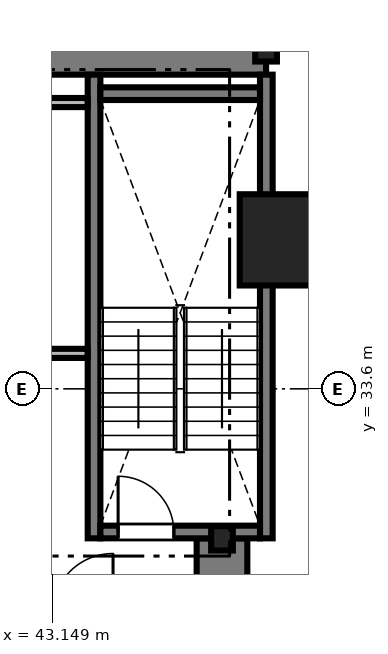
"""IFC4 building model, lengths in metres.
Left out: names, types, materials, properties, quantities, classifications, styles, units other than length and angle.
Written with IfcOpenShell. Run it as: python <this file> out.ifc"""

import sys

from ifc_helpers import new_model, si_unit, direction, frame, frame_2d, origin, origin_2d, place, context, subcontext, project, spatial, rectangle, i_section, extrude, source, transform, mapped, element, fill, save


model = new_model("IFC4")
c1 = context("Model", 3, precision=1e-05, world=origin(), true_north=direction((0.0, 1.0)))
c2 = subcontext(c1, "Body", "Model", "MODEL_VIEW")
j1 = project(units=[si_unit("LENGTHUNIT", "METRE"), si_unit("PLANEANGLEUNIT", "RADIAN")], contexts=[c1])
p1 = place(None, origin())
s1 = spatial("IfcSite", under=j1, at=p1, CompositionType="ELEMENT")
p2 = place(p1, origin())
s2 = spatial("IfcBuilding", under=s1, at=p2, CompositionType="ELEMENT")
p3 = place(p2, frame((0.0, 0.0, 31.25)))
s3 = spatial("IfcBuildingStorey", under=s2, at=p3, CompositionType="ELEMENT", Elevation=31.25)
m1 = source(origin(), c2, "Body", "SweptSolid", [
    extrude(rectangle(XDim=17.52, YDim=1.0, at=frame_2d((8.76, 0.0))), origin(), (0.0, 0.0, 1.0), 3.41),
])
p4 = place(p3, frame((29.85, 40.3, 0.0), z_axis=(0.0, 0.0, 1.0), x_axis=(1.0, 0.0, 0.0)))
e1 = element("IfcWall", 1, at=p4, inside=s3, PredefinedType="SHEAR", context=c2, shape_type="MappedRepresentation", body=[
    mapped(m1, transform((0.0, 0.0, 0.0), scale=1.0)),
])
m2 = source(origin(), c2, "Body", "SweptSolid", [
    extrude(rectangle(XDim=13.15, YDim=1.0, at=frame_2d((6.575, 0.0))), origin(), (0.0, 0.0, 1.0), 3.41),
])
p5 = place(p3, frame((46.5, 17.5, 0.0), z_axis=(0.0, 0.0, 1.0), x_axis=(0.0, 1.0, 0.0)))
e2 = element("IfcWall", 2, at=p5, inside=s3, PredefinedType="SHEAR", context=c2, shape_type="MappedRepresentation", body=[
    mapped(m2, transform((0.0, 0.0, 0.0), scale=1.0)),
])
m3 = source(origin(), c2, "Body", "SweptSolid", [
    extrude(i_section(OverallWidth=0.428, OverallDepth=0.481, WebThickness=0.04, FlangeThickness=0.063, FilletRadius=0.015, at=origin_2d()), origin(), (0.0, 0.0, 1.0), 3.41),
])
for number, where, z_axis, x_axis in (
    (3, (46.5, 30.65, 0.0), (0.0, 0.0, 1.0), (1.0, 0.0, 0.0)),
    (4, (47.37, 40.3, 0.0), (0.0, 0.0, 1.0), (1.0, 0.0, 0.0)),
):
    element("IfcColumn", number, at=place(p3, frame(where, z_axis=z_axis, x_axis=x_axis)), inside=s3, PredefinedType="COLUMN", context=c2, shape_type="MappedRepresentation", body=[
        mapped(m3, transform((0.0, 0.0, 0.0), scale=1.0)),
    ])
m4 = source(origin(), c2, "Body", "SweptSolid", [
    extrude(rectangle(XDim=1.8, YDim=1.8, at=origin_2d()), origin(), (0.0, 0.0, 1.0), 3.41),
])
p6 = place(p3, frame((47.75, 36.54, 0.0), z_axis=(0.0, 0.0, 1.0), x_axis=(1.0, 0.0, 0.0)))
e5 = element("IfcColumn", 5, at=p6, inside=s3, PredefinedType="COLUMN", context=c2, shape_type="MappedRepresentation", body=[
    mapped(m4, transform((0.0, 0.0, 0.0), scale=1.0)),
])
m5 = source(origin(), c2, "Body", "SweptSolid", [
    extrude(rectangle(XDim=9.15, YDim=0.25, at=frame_2d((4.575, 0.0))), origin(), (0.0, 0.0, 1.0), 3.45),
])
for number, where, z_axis, x_axis in (
    (6, (43.975, 30.65, 0.0), (0.0, 0.0, 1.0), (0.0, 1.0, 0.0)),
    (7, (47.375, 30.65, 0.0), (0.0, 0.0, 1.0), (0.0, 1.0, 0.0)),
):
    element("IfcWall", number, at=place(p3, frame(where, z_axis=z_axis, x_axis=x_axis)), inside=s3, PredefinedType="SOLIDWALL", context=c2, shape_type="MappedRepresentation", body=[
        mapped(m5, transform((0.0, 0.0, 0.0), scale=1.0)),
    ])
m6 = source(origin(), c2, "Body", "SweptSolid", [
    extrude(rectangle(XDim=3.15, YDim=0.25, at=frame_2d((1.575, 0.0))), origin(), (0.0, 0.0, 1.0), 3.45),
])
p7 = place(p3, frame((44.1, 39.425, 0.0), z_axis=(0.0, 0.0, 1.0), x_axis=(1.0, 0.0, 0.0)))
e8 = element("IfcWall", 8, at=p7, inside=s3, PredefinedType="SOLIDWALL", context=c2, shape_type="MappedRepresentation", body=[
    mapped(m6, transform((0.0, 0.0, 0.0), scale=1.0)),
])
p8 = place(p3, frame((44.1, 30.775, 0.0), z_axis=(0.0, 0.0, 1.0), x_axis=(1.0, 0.0, 0.0)))
e9 = element("IfcWall", 9, at=p8, inside=s3, PredefinedType="SOLIDWALL", context=c2, shape_type="MappedRepresentation", body=[
    mapped(m6, transform((0.0, 0.0, 0.0), scale=1.0)),
])
m7 = source(origin(), c2, "Body", "SweptSolid", [
    extrude(rectangle(XDim=1.1, YDim=2.2, at=frame_2d((0.55, 1.1))), frame((0.0, 0.135, 0.0), z_axis=(0.0, -1.0, 0.0), x_axis=(1.0, 0.0, 0.0)), (0.0, 0.0, 1.0), 0.27),
])
p9 = place(p8, frame((0.35, 0.0, 0.0)))
e10 = element("IfcOpeningElement", 10, at=p9, cuts=e9, PredefinedType="OPENING", context=c2, shape_type="MappedRepresentation", body=[
    mapped(m7, transform((0.0, 0.0, 0.0), scale=1.0)),
])
m8 = source(origin(), c2, "Body", "SweptSolid", [
    extrude(rectangle(XDim=1.128, YDim=0.18, at=frame_2d((0.564, 0.0))), origin(), (0.0, 0.0, 1.0), 3.41),
])
for number, where, z_axis, x_axis in (
    (11, (42.72, 34.3, 0.0), (0.0, 0.0, 1.0), (1.0, 0.0, 0.0)),
    (12, (42.72, 39.25, 0.0), (0.0, 0.0, 1.0), (1.0, 0.0, 0.0)),
):
    element("IfcWall", number, at=place(p3, frame(where, z_axis=z_axis, x_axis=x_axis)), inside=s3, PredefinedType="PARTITIONING", context=c2, shape_type="MappedRepresentation", body=[
        mapped(m8, transform((0.0, 0.0, 0.0), scale=1.0)),
    ])
m9 = source(origin(), c2, "Body", "SweptSolid", [
    extrude(rectangle(XDim=1.1, YDim=2.2, at=frame_2d((0.55, 1.1))), frame((0.0, 0.025, 0.0), z_axis=(0.0, -1.0, 0.0), x_axis=(1.0, 0.0, 0.0)), (0.0, 0.0, 1.0), 0.05),
])
p10 = place(p9, origin())
e13 = element("IfcDoor", 13, at=p10, inside=s3, OperationType="SINGLE_SWING_LEFT", PredefinedType="DOOR", context=c2, shape_type="MappedRepresentation", body=[
    mapped(m9, transform((0.0, 0.0, 0.0), scale=1.0)),
])
fill(e10, e13)
save(model, sys.argv[1])
